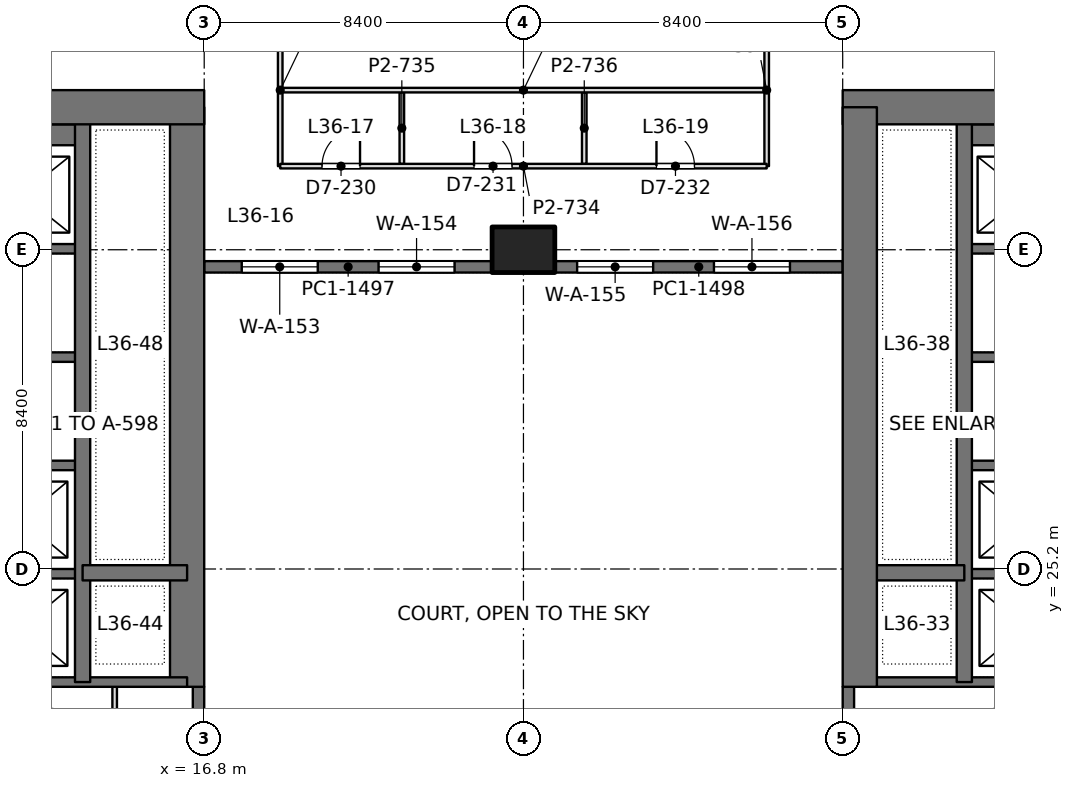
"""IFC4 building model, lengths in metres.
Left out: names, types, materials, properties, quantities, classifications, styles, units other than length and angle.
Written with IfcOpenShell. Run it as: python <this file> out.ifc"""

import sys

from ifc_helpers import new_model, si_unit, direction, frame, frame_2d, origin, origin_2d, place, context, subcontext, project, spatial, rectangle, extrude, element, fill, save


model = new_model("IFC4")
c1 = context("Model", 3, precision=1e-05, world=origin(), true_north=direction((0.0, 1.0)))
c2 = subcontext(c1, "Body", "Model", "MODEL_VIEW")
j1 = project(units=[si_unit("LENGTHUNIT", "METRE"), si_unit("PLANEANGLEUNIT", "RADIAN")], contexts=[c1])
p1 = place(None, origin())
s1 = spatial("IfcSite", under=j1, at=p1, CompositionType="ELEMENT")
p2 = place(p1, origin())
s2 = spatial("IfcBuilding", under=s1, at=p2, CompositionType="ELEMENT")
p3 = place(p2, frame((0.0, 0.0, 159.6)))
s3 = spatial("IfcBuildingStorey", under=s2, at=p3, CompositionType="ELEMENT", Elevation=159.6)
p4 = place(p3, frame((25.2, 33.6, 0.0), z_axis=(0.0, 0.0, 1.0), x_axis=(1.0, 0.0, 0.0)))
e1 = element("IfcColumn", 1, at=p4, inside=s3, PredefinedType="COLUMN", context=c2, shape_type="SweptSolid", body=[
    extrude(rectangle(XDim=1.65, YDim=1.2, at=origin_2d()), origin(), (0.0, 0.0, 1.0), 4.2),
])
p5 = place(p3, frame((-1.2, 37.35, 0.0), z_axis=(0.0, 0.0, 1.0), x_axis=(1.0, 0.0, 0.0)))
e2 = element("IfcWall", 2, at=p5, inside=s3, PredefinedType="SHEAR", context=c2, shape_type="SweptSolid", body=[
    extrude(rectangle(XDim=18.0, YDim=0.9, at=frame_2d((9.0, 0.0))), origin(), (0.0, 0.0, 1.0), 4.2),
])
p6 = place(p5, frame((8.95, 0.0, 0.0)))
e3 = element("IfcOpeningElement", 3, at=p6, cuts=e2, PredefinedType="OPENING", context=c2, shape_type="SweptSolid", body=[
    extrude(rectangle(XDim=1.8, YDim=2.4, at=frame_2d((0.9, 1.2))), frame((0.0, 0.46, 0.0), z_axis=(0.0, -1.0, 0.0), x_axis=(1.0, 0.0, 0.0)), (0.0, 0.0, 1.0), 0.92),
])
p7 = place(p3, frame((16.35, 22.1, 0.0), z_axis=(0.0, 0.0, 1.0), x_axis=(0.0, 1.0, 0.0)))
e4 = element("IfcWall", 4, at=p7, inside=s3, PredefinedType="SHEAR", context=c2, shape_type="SweptSolid", body=[
    extrude(rectangle(XDim=15.25, YDim=0.9, at=frame_2d((7.625, 0.0))), origin(), (0.0, 0.0, 1.0), 4.2),
])
p8 = place(p3, frame((13.6, 22.225, 0.0), z_axis=(0.0, 0.0, 1.0), x_axis=(0.0, 1.0, 0.0)))
e5 = element("IfcWall", 5, at=p8, inside=s3, PredefinedType="SHEAR", context=c2, shape_type="SweptSolid", body=[
    extrude(rectangle(XDim=15.125, YDim=0.4, at=frame_2d((7.562, 0.0))), origin(), (0.0, 0.0, 1.0), 4.2),
])
p9 = place(p3, frame((13.6, 25.1, 0.0), z_axis=(0.0, 0.0, 1.0), x_axis=(1.0, 0.0, 0.0)))
e6 = element("IfcWall", 6, at=p9, inside=s3, PredefinedType="SHEAR", context=c2, shape_type="SweptSolid", body=[
    extrude(rectangle(XDim=2.75, YDim=0.4, at=frame_2d((1.375, 0.0))), origin(), (0.0, 0.0, 1.0), 4.2),
])
p10 = place(p3, frame((10.4, 22.225, 0.0), z_axis=(0.0, 0.0, 1.0), x_axis=(1.0, 0.0, 0.0)))
e7 = element("IfcWall", 7, at=p10, inside=s3, PredefinedType="SHEAR", context=c2, shape_type="SweptSolid", body=[
    extrude(rectangle(XDim=5.95, YDim=0.25, at=frame_2d((2.975, 0.0))), origin(), (0.0, 0.0, 1.0), 4.2),
])
for number, where, z_axis, x_axis in (
    (8, (10.4, 25.075, 0.0), (0.0, 0.0, 1.0), (1.0, 0.0, 0.0)),
    (9, (10.4, 27.925, 0.0), (0.0, 0.0, 1.0), (1.0, 0.0, 0.0)),
    (10, (10.4, 30.775, 0.0), (0.0, 0.0, 1.0), (1.0, 0.0, 0.0)),
    (11, (10.4, 33.625, 0.0), (0.0, 0.0, 1.0), (1.0, 0.0, 0.0)),
):
    element("IfcWall", number, at=place(p3, frame(where, z_axis=z_axis, x_axis=x_axis)), inside=s3, PredefinedType="SHEAR", context=c2, shape_type="SweptSolid", body=[
        extrude(rectangle(XDim=3.2, YDim=0.25, at=frame_2d((1.6, 0.0))), origin(), (0.0, 0.0, 1.0), 4.2),
    ])
p11 = place(p3, frame((10.4, 36.625, 0.0), z_axis=(0.0, 0.0, 1.0), x_axis=(1.0, 0.0, 0.0)))
e12 = element("IfcWall", 12, at=p11, inside=s3, PredefinedType="SHEAR", context=c2, shape_type="SweptSolid", body=[
    extrude(rectangle(XDim=3.2, YDim=0.55, at=frame_2d((1.6, 0.0))), origin(), (0.0, 0.0, 1.0), 4.2),
])
p12 = place(p3, frame((33.6, 37.35, 0.0), z_axis=(0.0, 0.0, 1.0), x_axis=(1.0, 0.0, 0.0)))
e13 = element("IfcWall", 13, at=p12, inside=s3, PredefinedType="SHEAR", context=c2, shape_type="SweptSolid", body=[
    extrude(rectangle(XDim=18.0, YDim=0.9, at=frame_2d((9.0, 0.0))), origin(), (0.0, 0.0, 1.0), 4.2),
])
p13 = place(p12, frame((7.25, 0.0, 0.0)))
e14 = element("IfcOpeningElement", 14, at=p13, cuts=e13, PredefinedType="OPENING", context=c2, shape_type="SweptSolid", body=[
    extrude(rectangle(XDim=1.8, YDim=2.4, at=frame_2d((0.9, 1.2))), frame((0.0, 0.46, 0.0), z_axis=(0.0, -1.0, 0.0), x_axis=(1.0, 0.0, 0.0)), (0.0, 0.0, 1.0), 0.92),
])
p14 = place(p3, frame((34.05, 22.1, 0.0), z_axis=(0.0, 0.0, 1.0), x_axis=(0.0, 1.0, 0.0)))
e15 = element("IfcWall", 15, at=p14, inside=s3, PredefinedType="SHEAR", context=c2, shape_type="SweptSolid", body=[
    extrude(rectangle(XDim=15.25, YDim=0.9, at=frame_2d((7.625, 0.0))), origin(), (0.0, 0.0, 1.0), 4.2),
])
p15 = place(p3, frame((36.8, 22.225, 0.0), z_axis=(0.0, 0.0, 1.0), x_axis=(0.0, 1.0, 0.0)))
e16 = element("IfcWall", 16, at=p15, inside=s3, PredefinedType="SHEAR", context=c2, shape_type="SweptSolid", body=[
    extrude(rectangle(XDim=15.125, YDim=0.4, at=frame_2d((7.562, 0.0))), origin(), (0.0, 0.0, 1.0), 4.2),
])
p16 = place(p3, frame((36.8, 25.1, 0.0), z_axis=(0.0, 0.0, 1.0), x_axis=(-1.0, 0.0, 0.0)))
e17 = element("IfcWall", 17, at=p16, inside=s3, PredefinedType="SHEAR", context=c2, shape_type="SweptSolid", body=[
    extrude(rectangle(XDim=2.75, YDim=0.4, at=frame_2d((1.375, 0.0))), origin(), (0.0, 0.0, 1.0), 4.2),
])
p17 = place(p3, frame((40.0, 22.225, 0.0), z_axis=(0.0, 0.0, 1.0), x_axis=(-1.0, 0.0, 0.0)))
e18 = element("IfcWall", 18, at=p17, inside=s3, PredefinedType="SHEAR", context=c2, shape_type="SweptSolid", body=[
    extrude(rectangle(XDim=5.95, YDim=0.25, at=frame_2d((2.975, 0.0))), origin(), (0.0, 0.0, 1.0), 4.2),
])
for number, where, z_axis, x_axis in (
    (19, (40.0, 25.075, 0.0), (0.0, 0.0, 1.0), (-1.0, 0.0, 0.0)),
    (20, (40.0, 27.925, 0.0), (0.0, 0.0, 1.0), (-1.0, 0.0, 0.0)),
    (21, (40.0, 30.775, 0.0), (0.0, 0.0, 1.0), (-1.0, 0.0, 0.0)),
    (22, (40.0, 33.625, 0.0), (0.0, 0.0, 1.0), (-1.0, 0.0, 0.0)),
):
    element("IfcWall", number, at=place(p3, frame(where, z_axis=z_axis, x_axis=x_axis)), inside=s3, PredefinedType="SHEAR", context=c2, shape_type="SweptSolid", body=[
        extrude(rectangle(XDim=3.2, YDim=0.25, at=frame_2d((1.6, 0.0))), origin(), (0.0, 0.0, 1.0), 4.2),
    ])
p18 = place(p3, frame((40.0, 36.625, 0.0), z_axis=(0.0, 0.0, 1.0), x_axis=(-1.0, 0.0, 0.0)))
e23 = element("IfcWall", 23, at=p18, inside=s3, PredefinedType="SHEAR", context=c2, shape_type="SweptSolid", body=[
    extrude(rectangle(XDim=3.2, YDim=0.55, at=frame_2d((1.6, 0.0))), origin(), (0.0, 0.0, 1.0), 4.2),
])
p19 = place(p3, frame((16.65, 17.1, 0.0), z_axis=(0.0, 0.0, 1.0), x_axis=(0.0, 1.0, 0.0)))
e24 = element("IfcWall", 24, at=p19, inside=s3, PredefinedType="SOLIDWALL", context=c2, shape_type="SweptSolid", body=[
    extrude(rectangle(XDim=5.0, YDim=0.3, at=frame_2d((2.5, 0.0))), origin(), (0.0, 0.0, 1.0), 4.05),
])
p20 = place(p19, frame((1.3, 0.0, 0.1)))
e25 = element("IfcOpeningElement", 25, at=p20, cuts=e24, PredefinedType="OPENING", context=c2, shape_type="SweptSolid", body=[
    extrude(rectangle(XDim=2.0, YDim=3.0, at=frame_2d((1.0, 1.5))), frame((0.0, 0.16, 0.0), z_axis=(0.0, -1.0, 0.0), x_axis=(1.0, 0.0, 0.0)), (0.0, 0.0, 1.0), 0.32),
])
p21 = place(p3, frame((33.75, 17.1, 0.0), z_axis=(0.0, 0.0, 1.0), x_axis=(0.0, 1.0, 0.0)))
e26 = element("IfcWall", 26, at=p21, inside=s3, PredefinedType="SOLIDWALL", context=c2, shape_type="SweptSolid", body=[
    extrude(rectangle(XDim=5.0, YDim=0.3, at=frame_2d((2.5, 0.0))), origin(), (0.0, 0.0, 1.0), 4.05),
])
p22 = place(p21, frame((1.3, 0.0, 0.1)))
e27 = element("IfcOpeningElement", 27, at=p22, cuts=e26, PredefinedType="OPENING", context=c2, shape_type="SweptSolid", body=[
    extrude(rectangle(XDim=2.0, YDim=3.0, at=frame_2d((1.0, 1.5))), frame((0.0, 0.16, 0.0), z_axis=(0.0, -1.0, 0.0), x_axis=(1.0, 0.0, 0.0)), (0.0, 0.0, 1.0), 0.32),
])
p23 = place(p3, frame((16.8, 33.15, 0.0), z_axis=(0.0, 0.0, 1.0), x_axis=(1.0, 0.0, 0.0)))
e28 = element("IfcWall", 28, at=p23, inside=s3, PredefinedType="SOLIDWALL", context=c2, shape_type="SweptSolid", body=[
    extrude(rectangle(XDim=7.575, YDim=0.3, at=frame_2d((3.788, 0.0))), origin(), (0.0, 0.0, 1.0), 4.05),
])
p24 = place(p23, frame((0.988, 0.0, 0.1)))
e29 = element("IfcOpeningElement", 29, at=p24, cuts=e28, PredefinedType="OPENING", context=c2, shape_type="SweptSolid", body=[
    extrude(rectangle(XDim=2.0, YDim=3.0, at=frame_2d((1.0, 1.5))), frame((0.0, 0.16, 0.0), z_axis=(0.0, -1.0, 0.0), x_axis=(1.0, 0.0, 0.0)), (0.0, 0.0, 1.0), 0.32),
])
p25 = place(p23, frame((4.587, 0.0, 0.1)))
e30 = element("IfcOpeningElement", 30, at=p25, cuts=e28, PredefinedType="OPENING", context=c2, shape_type="SweptSolid", body=[
    extrude(rectangle(XDim=2.0, YDim=3.0, at=frame_2d((1.0, 1.5))), frame((0.0, 0.16, 0.0), z_axis=(0.0, -1.0, 0.0), x_axis=(1.0, 0.0, 0.0)), (0.0, 0.0, 1.0), 0.32),
])
p26 = place(p3, frame((26.025, 33.15, 0.0), z_axis=(0.0, 0.0, 1.0), x_axis=(1.0, 0.0, 0.0)))
e31 = element("IfcWall", 31, at=p26, inside=s3, PredefinedType="SOLIDWALL", context=c2, shape_type="SweptSolid", body=[
    extrude(rectangle(XDim=7.575, YDim=0.3, at=frame_2d((3.788, 0.0))), origin(), (0.0, 0.0, 1.0), 4.05),
])
p27 = place(p26, frame((0.587, 0.0, 0.1)))
e32 = element("IfcOpeningElement", 32, at=p27, cuts=e31, PredefinedType="OPENING", context=c2, shape_type="SweptSolid", body=[
    extrude(rectangle(XDim=2.0, YDim=3.0, at=frame_2d((1.0, 1.5))), frame((0.0, 0.16, 0.0), z_axis=(0.0, -1.0, 0.0), x_axis=(1.0, 0.0, 0.0)), (0.0, 0.0, 1.0), 0.32),
])
p28 = place(p26, frame((4.188, 0.0, 0.1)))
e33 = element("IfcOpeningElement", 33, at=p28, cuts=e31, PredefinedType="OPENING", context=c2, shape_type="SweptSolid", body=[
    extrude(rectangle(XDim=2.0, YDim=3.0, at=frame_2d((1.0, 1.5))), frame((0.0, 0.16, 0.0), z_axis=(0.0, -1.0, 0.0), x_axis=(1.0, 0.0, 0.0)), (0.0, 0.0, 1.0), 0.32),
])
p29 = place(p3, frame((14.444, 17.458, 0.0), z_axis=(0.0, 0.0, 1.0), x_axis=(0.0, 1.0, 0.0)))
e34 = element("IfcWall", 34, at=p29, inside=s3, PredefinedType="PARTITIONING", context=c2, shape_type="SweptSolid", body=[
    extrude(rectangle(XDim=4.644, YDim=0.12, at=frame_2d((2.322, 0.0))), origin(), (0.0, 0.0, 1.0), 3.6),
])
for number, where, z_axis, x_axis in (
    (35, (18.8, 35.8, 0.0), (0.0, 0.0, 1.0), (0.0, 1.0, 0.0)),
    (36, (31.6, 35.8, 0.0), (0.0, 0.0, 1.0), (0.0, 1.0, 0.0)),
):
    element("IfcWall", number, at=place(p3, frame(where, z_axis=z_axis, x_axis=x_axis)), inside=s3, PredefinedType="PARTITIONING", context=c2, shape_type="SweptSolid", body=[
        extrude(rectangle(XDim=4.0, YDim=0.12, at=frame_2d((2.0, 0.0))), origin(), (0.0, 0.0, 1.0), 4.05),
    ])
for number, where, z_axis, x_axis in (
    (37, (22.0, 35.858, 0.0), (0.0, 0.0, 1.0), (0.0, 1.0, 0.0)),
    (38, (26.8, 35.858, 0.0), (0.0, 0.0, 1.0), (0.0, 1.0, 0.0)),
):
    element("IfcWall", number, at=place(p3, frame(where, z_axis=z_axis, x_axis=x_axis)), inside=s3, PredefinedType="PARTITIONING", context=c2, shape_type="SweptSolid", body=[
        extrude(rectangle(XDim=1.884, YDim=0.12, at=frame_2d((0.942, 0.0))), origin(), (0.0, 0.0, 1.0), 4.05),
    ])
p30 = place(p3, frame((18.8, 35.8, 0.0), z_axis=(0.0, 0.0, 1.0), x_axis=(1.0, 0.0, 0.0)))
e39 = element("IfcWall", 39, at=p30, inside=s3, PredefinedType="PARTITIONING", context=c2, shape_type="SweptSolid", body=[
    extrude(rectangle(XDim=12.8, YDim=0.12, at=frame_2d((6.4, 0.0))), origin(), (0.0, 0.0, 1.0), 3.55),
])
p31 = place(p30, frame((1.1, 0.0, 0.0)))
e40 = element("IfcOpeningElement", 40, at=p31, cuts=e39, PredefinedType="OPENING", context=c2, shape_type="SweptSolid", body=[
    extrude(rectangle(XDim=1.0, YDim=2.4, at=frame_2d((0.5, 1.2))), frame((0.0, 0.07, 0.0), z_axis=(0.0, -1.0, 0.0), x_axis=(1.0, 0.0, 0.0)), (0.0, 0.0, 1.0), 0.14),
])
p32 = place(p30, frame((5.1, 0.0, 0.0)))
e41 = element("IfcOpeningElement", 41, at=p32, cuts=e39, PredefinedType="OPENING", context=c2, shape_type="SweptSolid", body=[
    extrude(rectangle(XDim=1.0, YDim=2.4, at=frame_2d((0.5, 1.2))), frame((0.0, 0.07, 0.0), z_axis=(0.0, -1.0, 0.0), x_axis=(1.0, 0.0, 0.0)), (0.0, 0.0, 1.0), 0.14),
])
p33 = place(p30, frame((9.9, 0.0, 0.0)))
e42 = element("IfcOpeningElement", 42, at=p33, cuts=e39, PredefinedType="OPENING", context=c2, shape_type="SweptSolid", body=[
    extrude(rectangle(XDim=1.0, YDim=2.4, at=frame_2d((0.5, 1.2))), frame((0.0, 0.07, 0.0), z_axis=(0.0, -1.0, 0.0), x_axis=(1.0, 0.0, 0.0)), (0.0, 0.0, 1.0), 0.14),
])
p34 = place(p3, frame((18.858, 37.8, 0.0), z_axis=(0.0, 0.0, 1.0), x_axis=(1.0, 0.0, 0.0)))
e43 = element("IfcWall", 43, at=p34, inside=s3, PredefinedType="PARTITIONING", context=c2, shape_type="SweptSolid", body=[
    extrude(rectangle(XDim=12.684, YDim=0.12, at=frame_2d((6.342, 0.0))), origin(), (0.0, 0.0, 1.0), 3.55),
])
p35 = place(p24, origin())
e44 = element("IfcWindow", 44, at=p35, inside=s3, PartitioningType="SINGLE_PANEL", PredefinedType="WINDOW", context=c2, shape_type="SweptSolid", body=[
    extrude(rectangle(XDim=2.0, YDim=3.0, at=frame_2d((1.0, 1.5))), frame((0.0, 0.03, 0.0), z_axis=(0.0, -1.0, 0.0), x_axis=(1.0, 0.0, 0.0)), (0.0, 0.0, 1.0), 0.06),
])
fill(e29, e44)
p36 = place(p25, origin())
e45 = element("IfcWindow", 45, at=p36, inside=s3, PartitioningType="SINGLE_PANEL", PredefinedType="WINDOW", context=c2, shape_type="SweptSolid", body=[
    extrude(rectangle(XDim=2.0, YDim=3.0, at=frame_2d((1.0, 1.5))), frame((0.0, 0.03, 0.0), z_axis=(0.0, -1.0, 0.0), x_axis=(1.0, 0.0, 0.0)), (0.0, 0.0, 1.0), 0.06),
])
fill(e30, e45)
p37 = place(p27, origin())
e46 = element("IfcWindow", 46, at=p37, inside=s3, PartitioningType="SINGLE_PANEL", PredefinedType="WINDOW", context=c2, shape_type="SweptSolid", body=[
    extrude(rectangle(XDim=2.0, YDim=3.0, at=frame_2d((1.0, 1.5))), frame((0.0, 0.03, 0.0), z_axis=(0.0, -1.0, 0.0), x_axis=(1.0, 0.0, 0.0)), (0.0, 0.0, 1.0), 0.06),
])
fill(e32, e46)
p38 = place(p28, origin())
e47 = element("IfcWindow", 47, at=p38, inside=s3, PartitioningType="SINGLE_PANEL", PredefinedType="WINDOW", context=c2, shape_type="SweptSolid", body=[
    extrude(rectangle(XDim=2.0, YDim=3.0, at=frame_2d((1.0, 1.5))), frame((0.0, 0.03, 0.0), z_axis=(0.0, -1.0, 0.0), x_axis=(1.0, 0.0, 0.0)), (0.0, 0.0, 1.0), 0.06),
])
fill(e33, e47)
p39 = place(p31, origin())
e48 = element("IfcDoor", 48, at=p39, inside=s3, OperationType="SINGLE_SWING_RIGHT", PredefinedType="DOOR", context=c2, shape_type="SweptSolid", body=[
    extrude(rectangle(XDim=1.0, YDim=2.4, at=frame_2d((0.5, 1.2))), frame((0.0, 0.025, 0.0), z_axis=(0.0, -1.0, 0.0), x_axis=(1.0, 0.0, 0.0)), (0.0, 0.0, 1.0), 0.05),
])
fill(e40, e48)
p40 = place(p32, origin())
e49 = element("IfcDoor", 49, at=p40, inside=s3, OperationType="SINGLE_SWING_LEFT", PredefinedType="DOOR", context=c2, shape_type="SweptSolid", body=[
    extrude(rectangle(XDim=1.0, YDim=2.4, at=frame_2d((0.5, 1.2))), frame((0.0, 0.025, 0.0), z_axis=(0.0, -1.0, 0.0), x_axis=(1.0, 0.0, 0.0)), (0.0, 0.0, 1.0), 0.05),
])
fill(e41, e49)
p41 = place(p33, origin())
e50 = element("IfcDoor", 50, at=p41, inside=s3, OperationType="SINGLE_SWING_LEFT", PredefinedType="DOOR", context=c2, shape_type="SweptSolid", body=[
    extrude(rectangle(XDim=1.0, YDim=2.4, at=frame_2d((0.5, 1.2))), frame((0.0, 0.025, 0.0), z_axis=(0.0, -1.0, 0.0), x_axis=(1.0, 0.0, 0.0)), (0.0, 0.0, 1.0), 0.05),
])
fill(e42, e50)
save(model, sys.argv[1])
